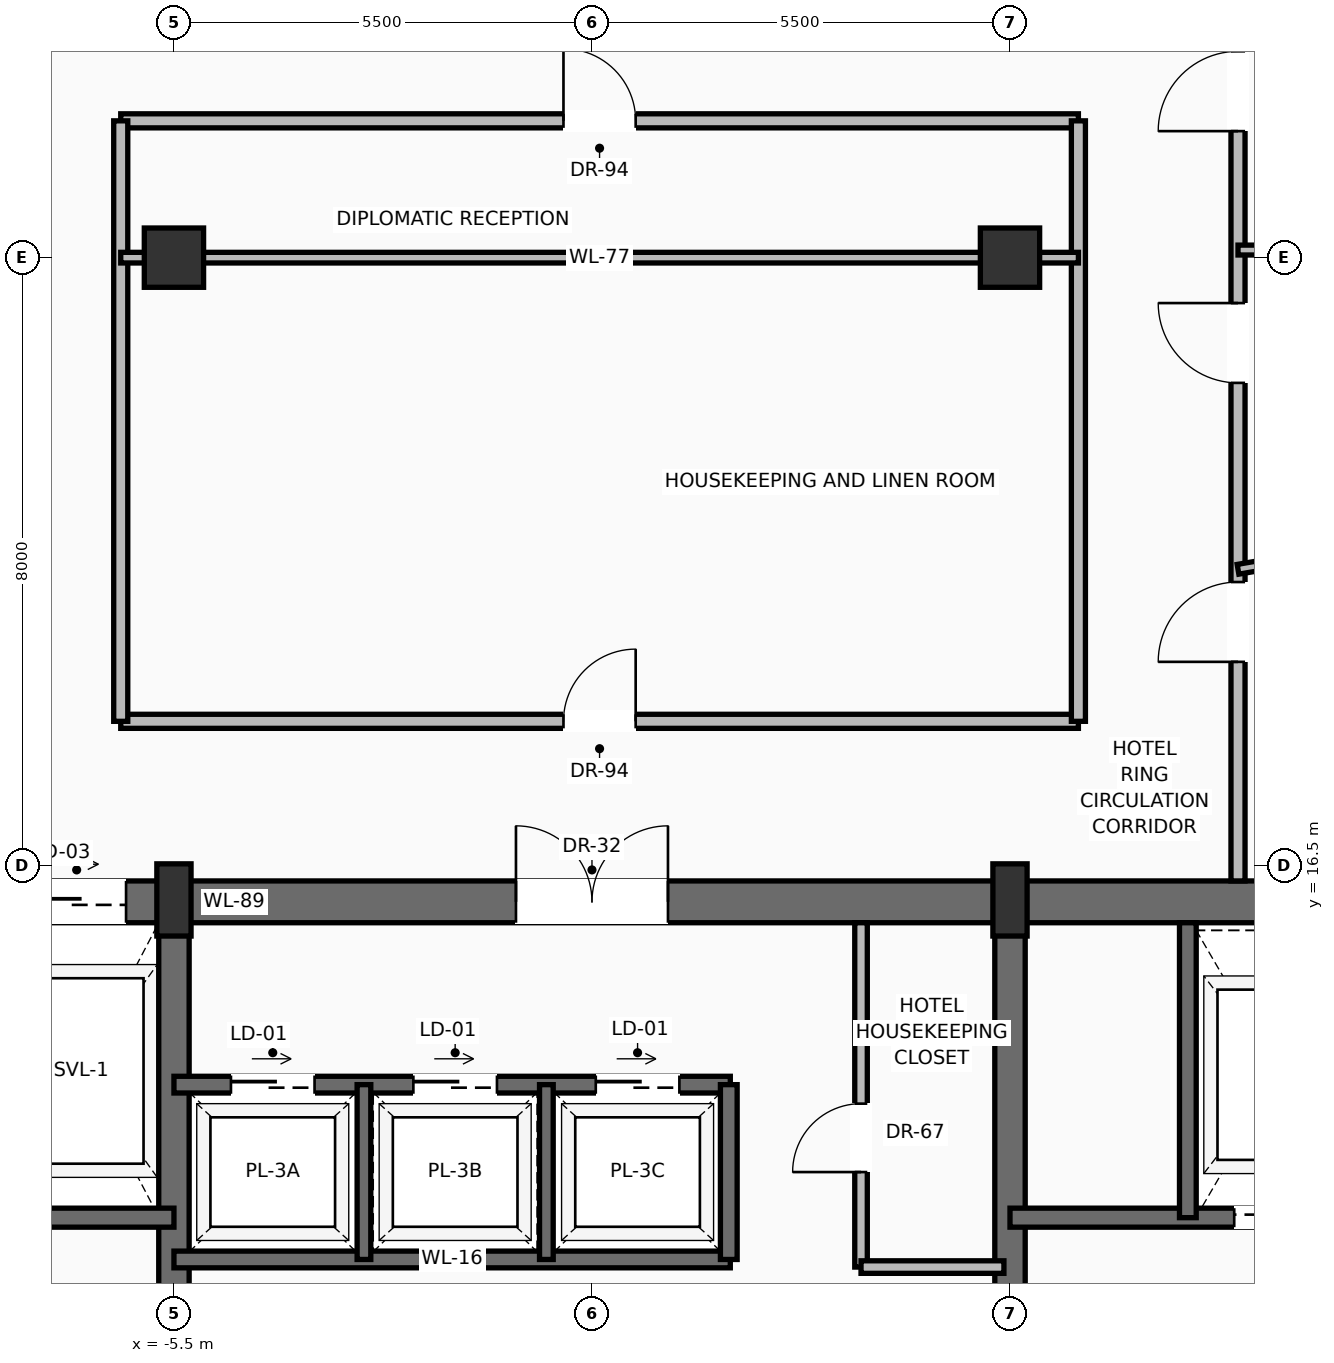
"""IFC4 building model, lengths in metres.
Left out: names, types, materials, properties, quantities, classifications, styles, units other than length and angle.
Written with IfcOpenShell. Run it as: python <this file> out.ifc"""

import sys

from ifc_helpers import new_model, si_unit, direction, frame, frame_2d, origin, origin_2d, place, context, subcontext, project, spatial, rectangle, extrude, source, transform, mapped, element, fill, save


model = new_model("IFC4")
c1 = context("Model", 3, precision=1e-05, world=origin(), true_north=direction((0.0, 1.0)))
c2 = subcontext(c1, "Body", "Model", "MODEL_VIEW")
j1 = project(units=[si_unit("LENGTHUNIT", "METRE"), si_unit("PLANEANGLEUNIT", "RADIAN")], contexts=[c1])
p1 = place(None, origin())
s1 = spatial("IfcSite", under=j1, at=p1, CompositionType="ELEMENT")
p2 = place(p1, origin())
s2 = spatial("IfcBuilding", under=s1, at=p2, CompositionType="ELEMENT")
p3 = place(p2, frame((0.0, 0.0, 251.05)))
s3 = spatial("IfcBuildingStorey", under=s2, at=p3, CompositionType="ELEMENT", Elevation=251.05)
p4 = place(p3, frame((-10.7, 16.025, 0.0), z_axis=(0.0, 0.0, 1.0), x_axis=(1.0, 0.0, 0.0)))
e1 = element("IfcWall", 1, at=p4, inside=s3, PredefinedType="SHEAR", context=c2, shape_type="SweptSolid", body=[
    extrude(rectangle(XDim=21.4, YDim=0.55, at=frame_2d((10.7, 0.0))), origin(), (0.0, 0.0, 1.0), 3.24),
])
p5 = place(p4, frame((3.27, 0.0, 0.0)))
e2 = element("IfcOpeningElement", 2, at=p5, cuts=e1, PredefinedType="OPENING", context=c2, shape_type="SweptSolid", body=[
    extrude(rectangle(XDim=1.3, YDim=2.3, at=frame_2d((0.65, 1.15))), frame((0.0, 0.285, 0.0), z_axis=(0.0, -1.0, 0.0), x_axis=(1.0, 0.0, 0.0)), (0.0, 0.0, 1.0), 0.57),
])
p6 = place(p4, frame((9.7, 0.0, 0.0)))
e3 = element("IfcOpeningElement", 3, at=p6, cuts=e1, PredefinedType="OPENING", context=c2, shape_type="SweptSolid", body=[
    extrude(rectangle(XDim=2.0, YDim=2.4, at=frame_2d((1.0, 1.2))), frame((0.0, 0.285, 0.0), z_axis=(0.0, -1.0, 0.0), x_axis=(1.0, 0.0, 0.0)), (0.0, 0.0, 1.0), 0.57),
])
p7 = place(p3, frame((-5.5, 0.575, 0.0), z_axis=(0.0, 0.0, 1.0), x_axis=(0.0, 1.0, 0.0)))
e4 = element("IfcWall", 4, at=p7, inside=s3, PredefinedType="SHEAR", context=c2, shape_type="SweptSolid", body=[
    extrude(rectangle(XDim=15.45, YDim=0.4, at=frame_2d((7.725, 0.0))), origin(), (0.0, 0.0, 1.0), 3.24),
])
p8 = place(p7, frame((8.925, 0.0, 0.0)))
e5 = element("IfcOpeningElement", 5, at=p8, cuts=e4, PredefinedType="OPENING", context=c2, shape_type="SweptSolid", body=[
    extrude(rectangle(XDim=1.1, YDim=2.2, at=frame_2d((0.55, 1.1))), frame((0.0, 0.21, 0.0), z_axis=(0.0, -1.0, 0.0), x_axis=(1.0, 0.0, 0.0)), (0.0, 0.0, 1.0), 0.42),
])
p9 = place(p3, frame((5.5, 0.575, 0.0), z_axis=(0.0, 0.0, 1.0), x_axis=(0.0, 1.0, 0.0)))
e6 = element("IfcWall", 6, at=p9, inside=s3, PredefinedType="SHEAR", context=c2, shape_type="SweptSolid", body=[
    extrude(rectangle(XDim=15.45, YDim=0.4, at=frame_2d((7.725, 0.0))), origin(), (0.0, 0.0, 1.0), 3.24),
])
p10 = place(p9, frame((8.925, 0.0, 0.0)))
e7 = element("IfcOpeningElement", 7, at=p10, cuts=e6, PredefinedType="OPENING", context=c2, shape_type="SweptSolid", body=[
    extrude(rectangle(XDim=1.1, YDim=2.2, at=frame_2d((0.55, 1.1))), frame((0.0, 0.21, 0.0), z_axis=(0.0, -1.0, 0.0), x_axis=(1.0, 0.0, 0.0)), (0.0, 0.0, 1.0), 0.42),
])
m1 = source(origin(), c2, "Body", "SweptSolid", [
    extrude(rectangle(XDim=0.45, YDim=0.95, at=origin_2d()), origin(), (0.0, 0.0, 1.0), 3.45),
])
for number, where, z_axis, x_axis in (
    (8, (-5.5, 16.05, 0.0), (0.0, 0.0, 1.0), (1.0, 0.0, 0.0)),
    (9, (5.5, 16.05, 0.0), (0.0, 0.0, 1.0), (1.0, 0.0, 0.0)),
):
    element("IfcColumn", number, at=place(p3, frame(where, z_axis=z_axis, x_axis=x_axis)), inside=s3, PredefinedType="PILASTER", context=c2, shape_type="MappedRepresentation", body=[
        mapped(m1, transform((0.0, 0.0, 0.0), scale=1.0)),
    ])
m2 = source(origin(), c2, "Body", "SweptSolid", [
    extrude(rectangle(XDim=0.78, YDim=0.78, at=origin_2d()), origin(), (0.0, 0.0, 1.0), 3.45),
])
for number, where, z_axis, x_axis in (
    (10, (-5.5, 24.5, 0.0), (0.0, 0.0, 1.0), (1.0, 0.0, 0.0)),
    (11, (5.5, 24.5, 0.0), (0.0, 0.0, 1.0), (1.0, 0.0, 0.0)),
):
    element("IfcColumn", number, at=place(p3, frame(where, z_axis=z_axis, x_axis=x_axis)), inside=s3, PredefinedType="COLUMN", context=c2, shape_type="MappedRepresentation", body=[
        mapped(m2, transform((0.0, 0.0, 0.0), scale=1.0)),
    ])
p11 = place(p3, frame((8.256, 31.961, 0.0), z_axis=(0.0, 0.0, 1.0), x_axis=(0.521016032817, -0.853546890069, 0.0)))
e12 = element("IfcWall", 12, at=p11, inside=s3, PredefinedType="SOLIDWALL", context=c2, shape_type="SweptSolid", body=[
    extrude(rectangle(XDim=19.778, YDim=0.28, at=frame_2d((9.889, 0.0))), origin(), (0.0, 0.0, 1.0), 2.82),
])
p12 = place(p11, frame((4.747, 0.0, 0.0)))
e13 = element("IfcOpeningElement", 13, at=p12, cuts=e12, PredefinedType="OPENING", context=c2, shape_type="SweptSolid", body=[
    extrude(rectangle(XDim=1.6, YDim=2.35, at=frame_2d((0.8, 1.175))), frame((0.0, 0.15, 0.0), z_axis=(0.0, -1.0, 0.0), x_axis=(1.0, 0.0, 0.0)), (0.0, 0.0, 1.0), 0.3),
])
p13 = place(p11, frame((13.449, 0.0, 0.9)))
e14 = element("IfcOpeningElement", 14, at=p13, cuts=e12, PredefinedType="OPENING", context=c2, shape_type="SweptSolid", body=[
    extrude(rectangle(XDim=1.55, YDim=1.75, at=frame_2d((0.775, 0.875))), frame((0.0, 0.15, 0.0), z_axis=(0.0, -1.0, 0.0), x_axis=(1.0, 0.0, 0.0)), (0.0, 0.0, 1.0), 0.3),
])
p14 = place(p3, frame((-5.5, 11.87, 0.0), z_axis=(0.0, 0.0, 1.0), x_axis=(-1.0, 0.0, 0.0)))
e15 = element("IfcWall", 15, at=p14, inside=s3, PredefinedType="SOLIDWALL", context=c2, shape_type="SweptSolid", body=[
    extrude(rectangle(XDim=4.65, YDim=0.25, at=frame_2d((2.325, 0.0))), origin(), (0.0, 0.0, 1.0), 3.24),
])
p15 = place(p14, frame((2.95, 0.0, 0.0)))
e16 = element("IfcOpeningElement", 16, at=p15, cuts=e15, PredefinedType="OPENING", context=c2, shape_type="SweptSolid", body=[
    extrude(rectangle(XDim=1.2, YDim=2.25, at=frame_2d((0.6, 1.125))), frame((0.0, 0.135, 0.0), z_axis=(0.0, -1.0, 0.0), x_axis=(1.0, 0.0, 0.0)), (0.0, 0.0, 1.0), 0.27),
])
p16 = place(p3, frame((10.15, 11.87, 0.0), z_axis=(0.0, 0.0, 1.0), x_axis=(-1.0, 0.0, 0.0)))
e17 = element("IfcWall", 17, at=p16, inside=s3, PredefinedType="SOLIDWALL", context=c2, shape_type="SweptSolid", body=[
    extrude(rectangle(XDim=4.65, YDim=0.25, at=frame_2d((2.325, 0.0))), origin(), (0.0, 0.0, 1.0), 3.24),
])
p17 = place(p16, frame((0.5, 0.0, 0.0)))
e18 = element("IfcOpeningElement", 18, at=p17, cuts=e17, PredefinedType="OPENING", context=c2, shape_type="SweptSolid", body=[
    extrude(rectangle(XDim=1.2, YDim=2.25, at=frame_2d((0.6, 1.125))), frame((0.0, 0.135, 0.0), z_axis=(0.0, -1.0, 0.0), x_axis=(1.0, 0.0, 0.0)), (0.0, 0.0, 1.0), 0.27),
])
p18 = place(p3, frame((7.84, 11.87, 0.0), z_axis=(0.0, 0.0, 1.0), x_axis=(0.0, 1.0, 0.0)))
e19 = element("IfcWall", 19, at=p18, inside=s3, PredefinedType="SOLIDWALL", context=c2, shape_type="SweptSolid", body=[
    extrude(rectangle(XDim=3.88, YDim=0.22, at=frame_2d((1.94, 0.0))), origin(), (0.0, 0.0, 1.0), 3.24),
])
p19 = place(p3, frame((-5.5, 11.32, 0.0), z_axis=(0.0, 0.0, 1.0), x_axis=(1.0, 0.0, 0.0)))
e20 = element("IfcWall", 20, at=p19, inside=s3, PredefinedType="SOLIDWALL", context=c2, shape_type="SweptSolid", body=[
    extrude(rectangle(XDim=7.32, YDim=0.22, at=frame_2d((3.66, 0.0))), origin(), (0.0, 0.0, 1.0), 3.24),
])
p20 = place(p3, frame((-5.5, 13.62, 0.0), z_axis=(0.0, 0.0, 1.0), x_axis=(1.0, 0.0, 0.0)))
e21 = element("IfcWall", 21, at=p20, inside=s3, PredefinedType="SOLIDWALL", context=c2, shape_type="SweptSolid", body=[
    extrude(rectangle(XDim=7.32, YDim=0.22, at=frame_2d((3.66, 0.0))), origin(), (0.0, 0.0, 1.0), 3.24),
])
p21 = place(p20, frame((0.75, 0.0, 0.0)))
e22 = element("IfcOpeningElement", 22, at=p21, cuts=e21, PredefinedType="OPENING", context=c2, shape_type="SweptSolid", body=[
    extrude(rectangle(XDim=1.1, YDim=2.2, at=frame_2d((0.55, 1.1))), frame((0.0, 0.12, 0.0), z_axis=(0.0, -1.0, 0.0), x_axis=(1.0, 0.0, 0.0)), (0.0, 0.0, 1.0), 0.24),
])
p22 = place(p20, frame((3.15, 0.0, 0.0)))
e23 = element("IfcOpeningElement", 23, at=p22, cuts=e21, PredefinedType="OPENING", context=c2, shape_type="SweptSolid", body=[
    extrude(rectangle(XDim=1.1, YDim=2.2, at=frame_2d((0.55, 1.1))), frame((0.0, 0.12, 0.0), z_axis=(0.0, -1.0, 0.0), x_axis=(1.0, 0.0, 0.0)), (0.0, 0.0, 1.0), 0.24),
])
p23 = place(p20, frame((5.55, 0.0, 0.0)))
e24 = element("IfcOpeningElement", 24, at=p23, cuts=e21, PredefinedType="OPENING", context=c2, shape_type="SweptSolid", body=[
    extrude(rectangle(XDim=1.1, YDim=2.2, at=frame_2d((0.55, 1.1))), frame((0.0, 0.12, 0.0), z_axis=(0.0, -1.0, 0.0), x_axis=(1.0, 0.0, 0.0)), (0.0, 0.0, 1.0), 0.24),
])
p24 = place(p3, frame((1.8, 11.32, 0.0), z_axis=(0.0, 0.0, 1.0), x_axis=(0.0, 1.0, 0.0)))
e25 = element("IfcWall", 25, at=p24, inside=s3, PredefinedType="SOLIDWALL", context=c2, shape_type="SweptSolid", body=[
    extrude(rectangle(XDim=2.3, YDim=0.22, at=frame_2d((1.15, 0.0))), origin(), (0.0, 0.0, 1.0), 3.24),
])
for number, where, z_axis, x_axis in (
    (26, (-3.0, 11.32, 0.0), (0.0, 0.0, 1.0), (0.0, 1.0, 0.0)),
    (27, (-0.6, 11.32, 0.0), (0.0, 0.0, 1.0), (0.0, 1.0, 0.0)),
):
    element("IfcWall", number, at=place(p3, frame(where, z_axis=z_axis, x_axis=x_axis)), inside=s3, PredefinedType="SOLIDWALL", context=c2, shape_type="SweptSolid", body=[
        extrude(rectangle(XDim=2.3, YDim=0.18, at=frame_2d((1.15, 0.0))), origin(), (0.0, 0.0, 1.0), 3.24),
    ])
p25 = place(p3, frame((3.54, 11.22, 0.0), z_axis=(0.0, 0.0, 1.0), x_axis=(0.0, 1.0, 0.0)))
e28 = element("IfcWall", 28, at=p25, inside=s3, PredefinedType="PARTITIONING", context=c2, shape_type="SweptSolid", body=[
    extrude(rectangle(XDim=4.53, YDim=0.165, at=frame_2d((2.265, 0.0))), origin(), (0.0, 0.0, 1.0), 3.232),
])
p26 = place(p25, frame((1.25, 0.0, 0.0)))
e29 = element("IfcOpeningElement", 29, at=p26, cuts=e28, PredefinedType="OPENING", context=c2, shape_type="SweptSolid", body=[
    extrude(rectangle(XDim=0.9, YDim=2.1, at=frame_2d((0.45, 1.05))), frame((0.0, 0.093, 0.0), z_axis=(0.0, -1.0, 0.0), x_axis=(1.0, 0.0, 0.0)), (0.0, 0.0, 1.0), 0.185),
])
p27 = place(p3, frame((3.54, 11.22, 0.0), z_axis=(0.0, 0.0, 1.0), x_axis=(1.0, 0.0, 0.0)))
e30 = element("IfcWall", 30, at=p27, inside=s3, PredefinedType="PARTITIONING", context=c2, shape_type="SweptSolid", body=[
    extrude(rectangle(XDim=1.88, YDim=0.165, at=frame_2d((0.94, 0.0))), origin(), (0.0, 0.0, 1.0), 3.232),
])
p28 = place(p3, frame((-6.2, 18.4, 0.0), z_axis=(0.0, 0.0, 1.0), x_axis=(1.0, 0.0, 0.0)))
e31 = element("IfcWall", 31, at=p28, inside=s3, PredefinedType="PARTITIONING", context=c2, shape_type="SweptSolid", body=[
    extrude(rectangle(XDim=12.6, YDim=0.185, at=frame_2d((6.3, 0.0))), origin(), (0.0, 0.0, 1.0), 3.232),
])
p29 = place(p28, frame((5.825, 0.0, 0.0)))
e32 = element("IfcOpeningElement", 32, at=p29, cuts=e31, PredefinedType="OPENING", context=c2, shape_type="SweptSolid", body=[
    extrude(rectangle(XDim=0.95, YDim=2.2, at=frame_2d((0.475, 1.1))), frame((0.0, 0.103, 0.0), z_axis=(0.0, -1.0, 0.0), x_axis=(1.0, 0.0, 0.0)), (0.0, 0.0, 1.0), 0.205),
])
p30 = place(p3, frame((-6.2, 26.3, 0.0), z_axis=(0.0, 0.0, 1.0), x_axis=(1.0, 0.0, 0.0)))
e33 = element("IfcWall", 33, at=p30, inside=s3, PredefinedType="PARTITIONING", context=c2, shape_type="SweptSolid", body=[
    extrude(rectangle(XDim=12.6, YDim=0.185, at=frame_2d((6.3, 0.0))), origin(), (0.0, 0.0, 1.0), 3.232),
])
p31 = place(p30, frame((5.825, 0.0, 0.0)))
e34 = element("IfcOpeningElement", 34, at=p31, cuts=e33, PredefinedType="OPENING", context=c2, shape_type="SweptSolid", body=[
    extrude(rectangle(XDim=0.95, YDim=2.2, at=frame_2d((0.475, 1.1))), frame((0.0, 0.103, 0.0), z_axis=(0.0, -1.0, 0.0), x_axis=(1.0, 0.0, 0.0)), (0.0, 0.0, 1.0), 0.205),
])
for number, where, z_axis, x_axis in (
    (35, (-6.2, 18.4, 0.0), (0.0, 0.0, 1.0), (0.0, 1.0, 0.0)),
    (36, (6.4, 18.4, 0.0), (0.0, 0.0, 1.0), (0.0, 1.0, 0.0)),
):
    element("IfcWall", number, at=place(p3, frame(where, z_axis=z_axis, x_axis=x_axis)), inside=s3, PredefinedType="PARTITIONING", context=c2, shape_type="SweptSolid", body=[
        extrude(rectangle(XDim=7.9, YDim=0.185, at=frame_2d((3.95, 0.0))), origin(), (0.0, 0.0, 1.0), 3.232),
    ])
p32 = place(p3, frame((8.5, 16.3, 0.0), z_axis=(0.0, 0.0, 1.0), x_axis=(0.0, 1.0, 0.0)))
e37 = element("IfcWall", 37, at=p32, inside=s3, PredefinedType="PARTITIONING", context=c2, shape_type="SweptSolid", body=[
    extrude(rectangle(XDim=12.1, YDim=0.185, at=frame_2d((6.05, 0.0))), origin(), (0.0, 0.0, 1.0), 3.232),
])
p33 = place(p32, frame((2.882, 0.0, 0.0)))
e38 = element("IfcOpeningElement", 38, at=p33, cuts=e37, PredefinedType="OPENING", context=c2, shape_type="SweptSolid", body=[
    extrude(rectangle(XDim=1.05, YDim=2.25, at=frame_2d((0.525, 1.125))), frame((0.0, 0.103, 0.0), z_axis=(0.0, -1.0, 0.0), x_axis=(1.0, 0.0, 0.0)), (0.0, 0.0, 1.0), 0.205),
])
p34 = place(p32, frame((6.552, 0.0, 0.0)))
e39 = element("IfcOpeningElement", 39, at=p34, cuts=e37, PredefinedType="OPENING", context=c2, shape_type="SweptSolid", body=[
    extrude(rectangle(XDim=1.05, YDim=2.25, at=frame_2d((0.525, 1.125))), frame((0.0, 0.103, 0.0), z_axis=(0.0, -1.0, 0.0), x_axis=(1.0, 0.0, 0.0)), (0.0, 0.0, 1.0), 0.205),
])
p35 = place(p32, frame((9.865, 0.0, 0.0)))
e40 = element("IfcOpeningElement", 40, at=p35, cuts=e37, PredefinedType="OPENING", context=c2, shape_type="SweptSolid", body=[
    extrude(rectangle(XDim=1.05, YDim=2.25, at=frame_2d((0.525, 1.125))), frame((0.0, 0.103, 0.0), z_axis=(0.0, -1.0, 0.0), x_axis=(1.0, 0.0, 0.0)), (0.0, 0.0, 1.0), 0.205),
])
p36 = place(p3, frame((-6.2, 24.5, 0.0), z_axis=(0.0, 0.0, 1.0), x_axis=(1.0, 0.0, 0.0)))
e41 = element("IfcWall", 41, at=p36, inside=s3, PredefinedType="PARTITIONING", context=c2, shape_type="SweptSolid", body=[
    extrude(rectangle(XDim=12.6, YDim=0.14, at=frame_2d((6.3, 0.0))), origin(), (0.0, 0.0, 1.0), 2.683),
])
p37 = place(p3, frame((8.5, 20.4, 0.0), z_axis=(0.0, 0.0, 1.0), x_axis=(0.985389713948, 0.170314742887, 0.0)))
e42 = element("IfcWall", 42, at=p37, inside=s3, PredefinedType="PARTITIONING", context=c2, shape_type="SweptSolid", body=[
    extrude(rectangle(XDim=6.395, YDim=0.13, at=frame_2d((3.197, 0.0))), origin(), (0.0, 0.0, 1.0), 3.232),
])
p38 = place(p3, frame((8.5, 24.6, 0.0), z_axis=(0.0, 0.0, 1.0), x_axis=(1.0, 0.0, 0.0)))
e43 = element("IfcWall", 43, at=p38, inside=s3, PredefinedType="PARTITIONING", context=c2, shape_type="SweptSolid", body=[
    extrude(rectangle(XDim=4.402, YDim=0.13, at=frame_2d((2.201, 0.0))), origin(), (0.0, 0.0, 1.0), 2.683),
])
m3 = source(origin(), c2, "Body", "SweptSolid", [
    extrude(rectangle(XDim=1.3, YDim=2.3, at=frame_2d((0.65, 1.15))), frame((0.0, 0.025, 0.0), z_axis=(0.0, -1.0, 0.0), x_axis=(1.0, 0.0, 0.0)), (0.0, 0.0, 1.0), 0.05),
])
p39 = place(p5, origin())
e44 = element("IfcDoor", 44, at=p39, inside=s3, OperationType="SLIDING_TO_RIGHT", PredefinedType="DOOR", context=c2, shape_type="MappedRepresentation", body=[
    mapped(m3, transform((0.0, 0.0, 0.0), scale=1.0)),
])
fill(e2, e44)
m4 = source(origin(), c2, "Body", "SweptSolid", [
    extrude(rectangle(XDim=1.2, YDim=2.25, at=frame_2d((0.6, 1.125))), frame((0.0, 0.025, 0.0), z_axis=(0.0, -1.0, 0.0), x_axis=(1.0, 0.0, 0.0)), (0.0, 0.0, 1.0), 0.05),
])
p40 = place(p17, origin())
e45 = element("IfcDoor", 45, at=p40, inside=s3, OperationType="SLIDING_TO_RIGHT", PredefinedType="DOOR", context=c2, shape_type="MappedRepresentation", body=[
    mapped(m4, transform((0.0, 0.0, 0.0), scale=1.0)),
])
fill(e18, e45)
m5 = source(origin(), c2, "Body", "SweptSolid", [
    extrude(rectangle(XDim=2.0, YDim=2.4, at=frame_2d((1.0, 1.2))), frame((0.0, 0.025, 0.0), z_axis=(0.0, -1.0, 0.0), x_axis=(1.0, 0.0, 0.0)), (0.0, 0.0, 1.0), 0.05),
])
p41 = place(p6, origin())
e46 = element("IfcDoor", 46, at=p41, inside=s3, OperationType="DOUBLE_DOOR_SINGLE_SWING", PredefinedType="DOOR", context=c2, shape_type="MappedRepresentation", body=[
    mapped(m5, transform((0.0, 0.0, 0.0), scale=1.0)),
])
fill(e3, e46)
m6 = source(origin(), c2, "Body", "SweptSolid", [
    extrude(rectangle(XDim=1.1, YDim=2.2, at=frame_2d((0.55, 1.1))), frame((0.0, 0.025, 0.0), z_axis=(0.0, -1.0, 0.0), x_axis=(1.0, 0.0, 0.0)), (0.0, 0.0, 1.0), 0.05),
])
p42 = place(p21, origin())
e47 = element("IfcDoor", 47, at=p42, inside=s3, OperationType="SLIDING_TO_RIGHT", PredefinedType="DOOR", context=c2, shape_type="MappedRepresentation", body=[
    mapped(m6, transform((0.0, 0.0, 0.0), scale=1.0)),
])
fill(e22, e47)
p43 = place(p22, origin())
e48 = element("IfcDoor", 48, at=p43, inside=s3, OperationType="SLIDING_TO_RIGHT", PredefinedType="DOOR", context=c2, shape_type="MappedRepresentation", body=[
    mapped(m6, transform((0.0, 0.0, 0.0), scale=1.0)),
])
fill(e23, e48)
p44 = place(p23, origin())
e49 = element("IfcDoor", 49, at=p44, inside=s3, OperationType="SLIDING_TO_RIGHT", PredefinedType="DOOR", context=c2, shape_type="MappedRepresentation", body=[
    mapped(m6, transform((0.0, 0.0, 0.0), scale=1.0)),
])
fill(e24, e49)
m7 = source(origin(), c2, "Body", "SweptSolid", [
    extrude(rectangle(XDim=0.9, YDim=2.1, at=frame_2d((0.45, 1.05))), frame((0.0, 0.025, 0.0), z_axis=(0.0, -1.0, 0.0), x_axis=(1.0, 0.0, 0.0)), (0.0, 0.0, 1.0), 0.05),
])
p45 = place(p26, origin())
e50 = element("IfcDoor", 50, at=p45, inside=s3, OperationType="SINGLE_SWING_LEFT", PredefinedType="DOOR", context=c2, shape_type="MappedRepresentation", body=[
    mapped(m7, transform((0.0, 0.0, 0.0), scale=1.0)),
])
fill(e29, e50)
m8 = source(origin(), c2, "Body", "SweptSolid", [
    extrude(rectangle(XDim=0.95, YDim=2.2, at=frame_2d((0.475, 1.1))), frame((0.0, 0.025, 0.0), z_axis=(0.0, -1.0, 0.0), x_axis=(1.0, 0.0, 0.0)), (0.0, 0.0, 1.0), 0.05),
])
p46 = place(p29, origin())
e51 = element("IfcDoor", 51, at=p46, inside=s3, OperationType="SINGLE_SWING_RIGHT", PredefinedType="DOOR", context=c2, shape_type="MappedRepresentation", body=[
    mapped(m8, transform((0.0, 0.0, 0.0), scale=1.0)),
])
fill(e32, e51)
p47 = place(p31, origin())
e52 = element("IfcDoor", 52, at=p47, inside=s3, OperationType="SINGLE_SWING_LEFT", PredefinedType="DOOR", context=c2, shape_type="MappedRepresentation", body=[
    mapped(m8, transform((0.0, 0.0, 0.0), scale=1.0)),
])
fill(e34, e52)
m9 = source(origin(), c2, "Body", "SweptSolid", [
    extrude(rectangle(XDim=1.05, YDim=2.25, at=frame_2d((0.525, 1.125))), frame((0.0, 0.025, 0.0), z_axis=(0.0, -1.0, 0.0), x_axis=(1.0, 0.0, 0.0)), (0.0, 0.0, 1.0), 0.05),
])
p48 = place(p33, origin())
e53 = element("IfcDoor", 53, at=p48, inside=s3, OperationType="SINGLE_SWING_LEFT", PredefinedType="DOOR", context=c2, shape_type="MappedRepresentation", body=[
    mapped(m9, transform((0.0, 0.0, 0.0), scale=1.0)),
])
fill(e38, e53)
p49 = place(p34, origin())
e54 = element("IfcDoor", 54, at=p49, inside=s3, OperationType="SINGLE_SWING_RIGHT", PredefinedType="DOOR", context=c2, shape_type="MappedRepresentation", body=[
    mapped(m9, transform((0.0, 0.0, 0.0), scale=1.0)),
])
fill(e39, e54)
p50 = place(p35, origin())
e55 = element("IfcDoor", 55, at=p50, inside=s3, OperationType="SINGLE_SWING_LEFT", PredefinedType="DOOR", context=c2, shape_type="MappedRepresentation", body=[
    mapped(m9, transform((0.0, 0.0, 0.0), scale=1.0)),
])
fill(e40, e55)
save(model, sys.argv[1])
